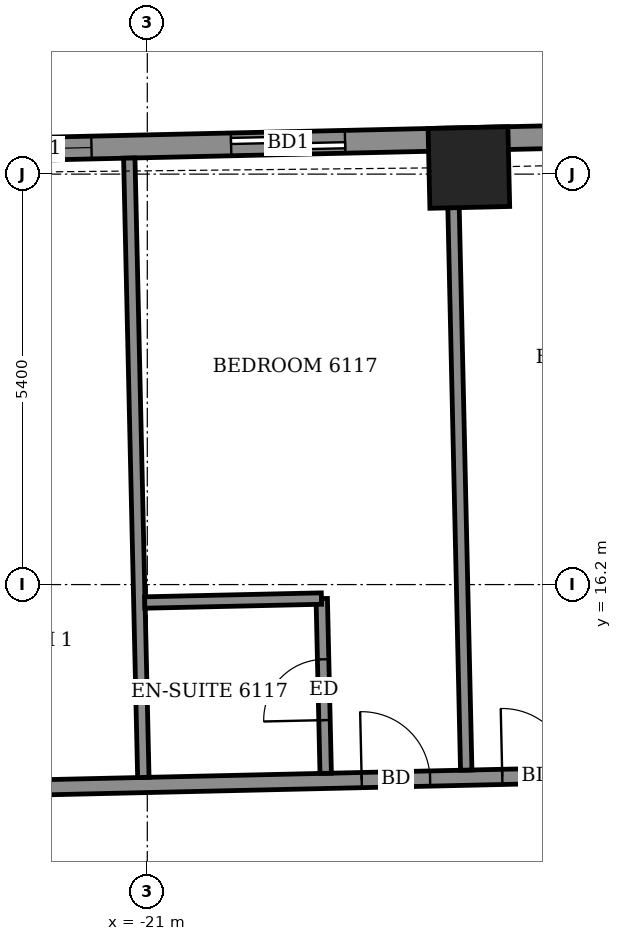
"""IFC4 building model, lengths in metres.
Left out: names, types, materials, properties, quantities, classifications, styles, units other than length and angle.
Written with IfcOpenShell. Run it as: python <this file> out.ifc"""

import sys

from ifc_helpers import new_model, si_unit, direction, frame, frame_2d, origin, origin_2d, place, context, subcontext, project, spatial, rectangle, extrude, element, fill, save


model = new_model("IFC4")
c1 = context("Model", 3, precision=1e-05, world=origin(), true_north=direction((0.0, 1.0)))
c2 = subcontext(c1, "Body", "Model", "MODEL_VIEW")
j1 = project(units=[si_unit("LENGTHUNIT", "METRE"), si_unit("PLANEANGLEUNIT", "RADIAN")], contexts=[c1])
p1 = place(None, origin())
s1 = spatial("IfcSite", under=j1, at=p1, CompositionType="ELEMENT")
p2 = place(p1, origin())
s2 = spatial("IfcBuilding", under=s1, at=p2, CompositionType="ELEMENT")
p3 = place(p2, frame((0.0, 0.0, 241.9)))
s3 = spatial("IfcBuildingStorey", under=s2, at=p3, CompositionType="ELEMENT", Elevation=241.9)
p4 = place(p3, frame((-16.769, 21.687, -0.55), z_axis=(0.0, 0.0, 1.0), x_axis=(-0.999742388325, -0.022697070002, 0.0)))
e1 = element("IfcColumn", 1, at=p4, inside=s3, PredefinedType="COLUMN", context=c2, shape_type="SweptSolid", body=[
    extrude(rectangle(XDim=1.05, YDim=1.05, at=origin_2d()), origin(), (0.0, 0.0, 1.0), 3.6),
])
p5 = place(p3, frame((20.403, 22.905, 0.0), z_axis=(0.0, 0.0, 1.0), x_axis=(-0.99974298964, -0.022670568288, 0.0)))
e2 = element("IfcWall", 2, at=p5, inside=s3, PredefinedType="SOLIDWALL", context=c2, shape_type="SweptSolid", body=[
    extrude(rectangle(XDim=44.509, YDim=0.3, at=frame_2d((22.254, 0.0))), origin(), (0.0, 0.0, 1.0), 2.5),
])
p6 = place(p5, frame((1.272, 0.0, 0.0)))
e3 = element("IfcOpeningElement", 3, at=p6, cuts=e2, PredefinedType="OPENING", context=c2, shape_type="SweptSolid", body=[
    extrude(rectangle(XDim=1.5, YDim=2.4, at=frame_2d((0.75, 1.2))), frame((0.0, 0.16, 0.0), z_axis=(0.0, -1.0, 0.0), x_axis=(1.0, 0.0, 0.0)), (0.0, 0.0, 1.0), 0.32),
])
p7 = place(p5, frame((4.501, 0.0, 0.0)))
e4 = element("IfcOpeningElement", 4, at=p7, cuts=e2, PredefinedType="OPENING", context=c2, shape_type="SweptSolid", body=[
    extrude(rectangle(XDim=1.5, YDim=2.4, at=frame_2d((0.75, 1.2))), frame((0.0, 0.16, 0.0), z_axis=(0.0, -1.0, 0.0), x_axis=(1.0, 0.0, 0.0)), (0.0, 0.0, 1.0), 0.32),
])
p8 = place(p5, frame((9.058, 0.0, 0.0)))
e5 = element("IfcOpeningElement", 5, at=p8, cuts=e2, PredefinedType="OPENING", context=c2, shape_type="SweptSolid", body=[
    extrude(rectangle(XDim=1.5, YDim=2.4, at=frame_2d((0.75, 1.2))), frame((0.0, 0.16, 0.0), z_axis=(0.0, -1.0, 0.0), x_axis=(1.0, 0.0, 0.0)), (0.0, 0.0, 1.0), 0.32),
])
p9 = place(p5, frame((12.46, 0.0, 0.0)))
e6 = element("IfcOpeningElement", 6, at=p9, cuts=e2, PredefinedType="OPENING", context=c2, shape_type="SweptSolid", body=[
    extrude(rectangle(XDim=1.5, YDim=2.4, at=frame_2d((0.75, 1.2))), frame((0.0, 0.16, 0.0), z_axis=(0.0, -1.0, 0.0), x_axis=(1.0, 0.0, 0.0)), (0.0, 0.0, 1.0), 0.32),
])
p10 = place(p5, frame((17.533, 0.0, 0.0)))
e7 = element("IfcOpeningElement", 7, at=p10, cuts=e2, PredefinedType="OPENING", context=c2, shape_type="SweptSolid", body=[
    extrude(rectangle(XDim=1.5, YDim=2.4, at=frame_2d((0.75, 1.2))), frame((0.0, 0.16, 0.0), z_axis=(0.0, -1.0, 0.0), x_axis=(1.0, 0.0, 0.0)), (0.0, 0.0, 1.0), 0.32),
])
p11 = place(p5, frame((22.993, 0.0, 0.0)))
e8 = element("IfcOpeningElement", 8, at=p11, cuts=e2, PredefinedType="OPENING", context=c2, shape_type="SweptSolid", body=[
    extrude(rectangle(XDim=1.2, YDim=2.4, at=frame_2d((0.6, 1.2))), frame((0.0, 0.16, 0.0), z_axis=(0.0, -1.0, 0.0), x_axis=(1.0, 0.0, 0.0)), (0.0, 0.0, 1.0), 0.32),
])
p12 = place(p5, frame((26.033, 0.0, 0.0)))
e9 = element("IfcOpeningElement", 9, at=p12, cuts=e2, PredefinedType="OPENING", context=c2, shape_type="SweptSolid", body=[
    extrude(rectangle(XDim=1.5, YDim=2.4, at=frame_2d((0.75, 1.2))), frame((0.0, 0.16, 0.0), z_axis=(0.0, -1.0, 0.0), x_axis=(1.0, 0.0, 0.0)), (0.0, 0.0, 1.0), 0.32),
])
p13 = place(p5, frame((30.827, 0.0, 0.0)))
e10 = element("IfcOpeningElement", 10, at=p13, cuts=e2, PredefinedType="OPENING", context=c2, shape_type="SweptSolid", body=[
    extrude(rectangle(XDim=1.5, YDim=2.4, at=frame_2d((0.75, 1.2))), frame((0.0, 0.16, 0.0), z_axis=(0.0, -1.0, 0.0), x_axis=(1.0, 0.0, 0.0)), (0.0, 0.0, 1.0), 0.32),
])
p14 = place(p5, frame((34.286, 0.0, 0.0)))
e11 = element("IfcOpeningElement", 11, at=p14, cuts=e2, PredefinedType="OPENING", context=c2, shape_type="SweptSolid", body=[
    extrude(rectangle(XDim=1.5, YDim=2.4, at=frame_2d((0.75, 1.2))), frame((0.0, 0.16, 0.0), z_axis=(0.0, -1.0, 0.0), x_axis=(1.0, 0.0, 0.0)), (0.0, 0.0, 1.0), 0.32),
])
p15 = place(p5, frame((38.811, 0.0, 0.0)))
e12 = element("IfcOpeningElement", 12, at=p15, cuts=e2, PredefinedType="OPENING", context=c2, shape_type="SweptSolid", body=[
    extrude(rectangle(XDim=1.5, YDim=2.4, at=frame_2d((0.75, 1.2))), frame((0.0, 0.16, 0.0), z_axis=(0.0, -1.0, 0.0), x_axis=(1.0, 0.0, 0.0)), (0.0, 0.0, 1.0), 0.32),
])
p16 = place(p5, frame((42.148, 0.0, 0.9)))
e13 = element("IfcOpeningElement", 13, at=p16, cuts=e2, PredefinedType="OPENING", context=c2, shape_type="SweptSolid", body=[
    extrude(rectangle(XDim=1.2, YDim=1.5, at=frame_2d((0.6, 0.75))), frame((0.0, 0.16, 0.0), z_axis=(0.0, -1.0, 0.0), x_axis=(1.0, 0.0, 0.0)), (0.0, 0.0, 1.0), 0.32),
])
p17 = place(p3, frame((-27.652, 13.413, 0.0), z_axis=(0.0, 0.0, 1.0), x_axis=(0.999742864992, 0.022676064408, 0.0)))
e14 = element("IfcWall", 14, at=p17, inside=s3, PredefinedType="PARTITIONING", context=c2, shape_type="SweptSolid", body=[
    extrude(rectangle(XDim=50.882, YDim=0.2, at=frame_2d((25.441, 0.0))), origin(), (0.0, 0.0, 1.0), 3.05),
])
p18 = place(p17, frame((47.801, 0.0, 0.0)))
e15 = element("IfcOpeningElement", 15, at=p18, cuts=e14, PredefinedType="OPENING", context=c2, shape_type="SweptSolid", body=[
    extrude(rectangle(XDim=1.0, YDim=2.1, at=frame_2d((0.5, 1.05))), frame((0.0, 0.11, 0.0), z_axis=(0.0, -1.0, 0.0), x_axis=(1.0, 0.0, 0.0)), (0.0, 0.0, 1.0), 0.22),
])
p19 = place(p17, frame((43.425, 0.0, 0.0)))
e16 = element("IfcOpeningElement", 16, at=p19, cuts=e14, PredefinedType="OPENING", context=c2, shape_type="SweptSolid", body=[
    extrude(rectangle(XDim=0.9, YDim=2.1, at=frame_2d((0.45, 1.05))), frame((0.0, 0.11, 0.0), z_axis=(0.0, -1.0, 0.0), x_axis=(1.0, 0.0, 0.0)), (0.0, 0.0, 1.0), 0.22),
])
p20 = place(p17, frame((36.8, 0.0, 0.0)))
e17 = element("IfcOpeningElement", 17, at=p20, cuts=e14, PredefinedType="OPENING", context=c2, shape_type="SweptSolid", body=[
    extrude(rectangle(XDim=0.9, YDim=2.1, at=frame_2d((0.45, 1.05))), frame((0.0, 0.11, 0.0), z_axis=(0.0, -1.0, 0.0), x_axis=(1.0, 0.0, 0.0)), (0.0, 0.0, 1.0), 0.22),
])
p21 = place(p17, frame((34.975, 0.0, 0.0)))
e18 = element("IfcOpeningElement", 18, at=p21, cuts=e14, PredefinedType="OPENING", context=c2, shape_type="SweptSolid", body=[
    extrude(rectangle(XDim=0.9, YDim=2.1, at=frame_2d((0.45, 1.05))), frame((0.0, 0.11, 0.0), z_axis=(0.0, -1.0, 0.0), x_axis=(1.0, 0.0, 0.0)), (0.0, 0.0, 1.0), 0.22),
])
p22 = place(p17, frame((28.325, 0.0, 0.0)))
e19 = element("IfcOpeningElement", 19, at=p22, cuts=e14, PredefinedType="OPENING", context=c2, shape_type="SweptSolid", body=[
    extrude(rectangle(XDim=0.9, YDim=2.1, at=frame_2d((0.45, 1.05))), frame((0.0, 0.11, 0.0), z_axis=(0.0, -1.0, 0.0), x_axis=(1.0, 0.0, 0.0)), (0.0, 0.0, 1.0), 0.22),
])
p23 = place(p17, frame((26.475, 0.0, 0.0)))
e20 = element("IfcOpeningElement", 20, at=p23, cuts=e14, PredefinedType="OPENING", context=c2, shape_type="SweptSolid", body=[
    extrude(rectangle(XDim=0.9, YDim=2.1, at=frame_2d((0.45, 1.05))), frame((0.0, 0.11, 0.0), z_axis=(0.0, -1.0, 0.0), x_axis=(1.0, 0.0, 0.0)), (0.0, 0.0, 1.0), 0.22),
])
p24 = place(p17, frame((19.825, 0.0, 0.0)))
e21 = element("IfcOpeningElement", 21, at=p24, cuts=e14, PredefinedType="OPENING", context=c2, shape_type="SweptSolid", body=[
    extrude(rectangle(XDim=0.9, YDim=2.1, at=frame_2d((0.45, 1.05))), frame((0.0, 0.11, 0.0), z_axis=(0.0, -1.0, 0.0), x_axis=(1.0, 0.0, 0.0)), (0.0, 0.0, 1.0), 0.22),
])
p25 = place(p17, frame((17.975, 0.0, 0.0)))
e22 = element("IfcOpeningElement", 22, at=p25, cuts=e14, PredefinedType="OPENING", context=c2, shape_type="SweptSolid", body=[
    extrude(rectangle(XDim=0.9, YDim=2.1, at=frame_2d((0.45, 1.05))), frame((0.0, 0.11, 0.0), z_axis=(0.0, -1.0, 0.0), x_axis=(1.0, 0.0, 0.0)), (0.0, 0.0, 1.0), 0.22),
])
p26 = place(p17, frame((11.325, 0.0, 0.0)))
e23 = element("IfcOpeningElement", 23, at=p26, cuts=e14, PredefinedType="OPENING", context=c2, shape_type="SweptSolid", body=[
    extrude(rectangle(XDim=0.9, YDim=2.1, at=frame_2d((0.45, 1.05))), frame((0.0, 0.11, 0.0), z_axis=(0.0, -1.0, 0.0), x_axis=(1.0, 0.0, 0.0)), (0.0, 0.0, 1.0), 0.22),
])
p27 = place(p17, frame((9.475, 0.0, 0.0)))
e24 = element("IfcOpeningElement", 24, at=p27, cuts=e14, PredefinedType="OPENING", context=c2, shape_type="SweptSolid", body=[
    extrude(rectangle(XDim=0.9, YDim=2.1, at=frame_2d((0.45, 1.05))), frame((0.0, 0.11, 0.0), z_axis=(0.0, -1.0, 0.0), x_axis=(1.0, 0.0, 0.0)), (0.0, 0.0, 1.0), 0.22),
])
p28 = place(p17, frame((2.772, 0.0, 0.0)))
e25 = element("IfcOpeningElement", 25, at=p28, cuts=e14, PredefinedType="OPENING", context=c2, shape_type="SweptSolid", body=[
    extrude(rectangle(XDim=1.0, YDim=2.1, at=frame_2d((0.5, 1.05))), frame((0.0, 0.11, 0.0), z_axis=(0.0, -1.0, 0.0), x_axis=(1.0, 0.0, 0.0)), (0.0, 0.0, 1.0), 0.22),
])
p29 = place(p3, frame((-21.052, 13.663, 0.0), z_axis=(0.0, 0.0, 1.0), x_axis=(-0.022706435224, 0.999742175663, 0.0)))
e26 = element("IfcWall", 26, at=p29, inside=s3, PredefinedType="PARTITIONING", context=c2, shape_type="SweptSolid", body=[
    extrude(rectangle(XDim=8.15, YDim=0.15, at=frame_2d((4.075, 0.0))), origin(), (0.0, 0.0, 1.0), 2.5),
])
p30 = place(p3, frame((-18.653, 13.717, 0.0), z_axis=(0.0, 0.0, 1.0), x_axis=(-0.022612884682, 0.999744296031, 0.0)))
e27 = element("IfcWall", 27, at=p30, inside=s3, PredefinedType="PARTITIONING", context=c2, shape_type="SweptSolid", body=[
    extrude(rectangle(XDim=2.3, YDim=0.15, at=frame_2d((1.15, 0.0))), origin(), (0.0, 0.0, 1.0), 3.05),
])
p31 = place(p30, frame((0.7, 0.0, 0.0)))
e28 = element("IfcOpeningElement", 28, at=p31, cuts=e27, PredefinedType="OPENING", context=c2, shape_type="SweptSolid", body=[
    extrude(rectangle(XDim=0.8, YDim=2.1, at=frame_2d((0.4, 1.05))), frame((0.0, 0.085, 0.0), z_axis=(0.0, -1.0, 0.0), x_axis=(1.0, 0.0, 0.0)), (0.0, 0.0, 1.0), 0.17),
])
p32 = place(p3, frame((-16.804, 13.759, 0.0), z_axis=(0.0, 0.0, 1.0), x_axis=(-0.022586673637, 0.999744888546, 0.0)))
e29 = element("IfcWall", 29, at=p32, inside=s3, PredefinedType="PARTITIONING", context=c2, shape_type="SweptSolid", body=[
    extrude(rectangle(XDim=8.15, YDim=0.15, at=frame_2d((4.075, 0.0))), origin(), (0.0, 0.0, 1.0), 3.05),
])
p33 = place(p3, frame((-21.034, 15.964, 0.0), z_axis=(0.0, 0.0, 1.0), x_axis=(0.999749954681, 0.022361308448, 0.0)))
e30 = element("IfcWall", 30, at=p33, inside=s3, PredefinedType="PARTITIONING", context=c2, shape_type="SweptSolid", body=[
    extrude(rectangle(XDim=2.325, YDim=0.15, at=frame_2d((1.163, 0.0))), origin(), (0.0, 0.0, 1.0), 3.05),
])
p34 = place(p15, origin())
e31 = element("IfcDoor", 31, at=p34, inside=s3, OperationType="SLIDING_TO_LEFT", PredefinedType="DOOR", context=c2, shape_type="SweptSolid", body=[
    extrude(rectangle(XDim=1.5, YDim=2.4, at=frame_2d((0.75, 1.2))), frame((0.0, 0.025, 0.0), z_axis=(0.0, -1.0, 0.0), x_axis=(1.0, 0.0, 0.0)), (0.0, 0.0, 1.0), 0.05),
])
fill(e12, e31)
p35 = place(p16, origin())
e32 = element("IfcWindow", 32, at=p35, inside=s3, PartitioningType="SINGLE_PANEL", PredefinedType="WINDOW", context=c2, shape_type="SweptSolid", body=[
    extrude(rectangle(XDim=1.2, YDim=1.5, at=frame_2d((0.6, 0.75))), frame((0.0, 0.03, 0.0), z_axis=(0.0, -1.0, 0.0), x_axis=(1.0, 0.0, 0.0)), (0.0, 0.0, 1.0), 0.06),
])
fill(e13, e32)
p36 = place(p26, origin())
e33 = element("IfcDoor", 33, at=p36, inside=s3, OperationType="SINGLE_SWING_RIGHT", PredefinedType="DOOR", context=c2, shape_type="SweptSolid", body=[
    extrude(rectangle(XDim=0.9, YDim=2.1, at=frame_2d((0.45, 1.05))), frame((0.0, 0.025, 0.0), z_axis=(0.0, -1.0, 0.0), x_axis=(1.0, 0.0, 0.0)), (0.0, 0.0, 1.0), 0.05),
])
fill(e23, e33)
p37 = place(p27, origin())
e34 = element("IfcDoor", 34, at=p37, inside=s3, OperationType="SINGLE_SWING_LEFT", PredefinedType="DOOR", context=c2, shape_type="SweptSolid", body=[
    extrude(rectangle(XDim=0.9, YDim=2.1, at=frame_2d((0.45, 1.05))), frame((0.0, 0.025, 0.0), z_axis=(0.0, -1.0, 0.0), x_axis=(1.0, 0.0, 0.0)), (0.0, 0.0, 1.0), 0.05),
])
fill(e24, e34)
p38 = place(p31, origin())
e35 = element("IfcDoor", 35, at=p38, inside=s3, OperationType="SINGLE_SWING_LEFT", PredefinedType="DOOR", context=c2, shape_type="SweptSolid", body=[
    extrude(rectangle(XDim=0.8, YDim=2.1, at=frame_2d((0.4, 1.05))), frame((0.0, 0.025, 0.0), z_axis=(0.0, -1.0, 0.0), x_axis=(1.0, 0.0, 0.0)), (0.0, 0.0, 1.0), 0.05),
])
fill(e28, e35)
save(model, sys.argv[1])
